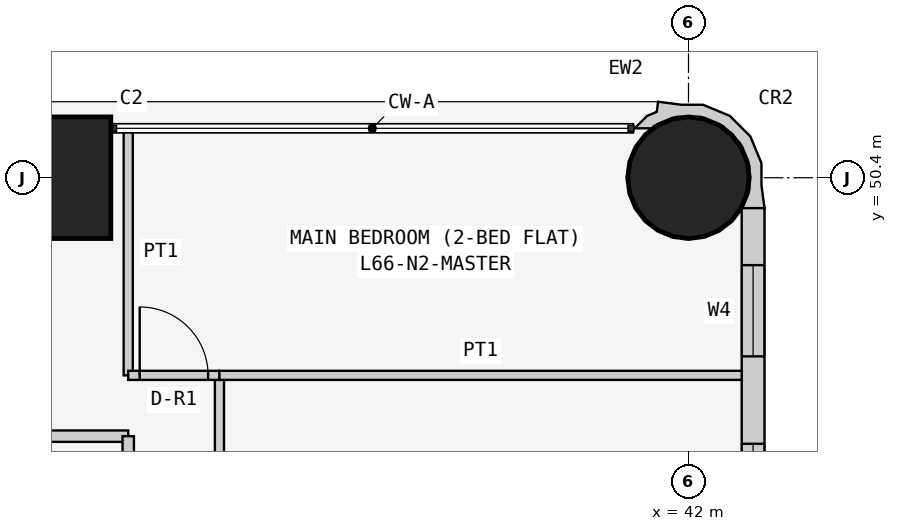
"""IFC4 building model, lengths in metres.
Left out: names, types, materials, properties, quantities, classifications, styles, units other than length and angle.
Written with IfcOpenShell. Run it as: python <this file> out.ifc"""

import sys

from ifc_helpers import new_model, si_unit, direction, frame, frame_2d, origin, origin_2d, place, context, subcontext, project, spatial, polyline, rectangle, circle, outline, extrude, element, fill, save


model = new_model("IFC4")
c1 = context("Model", 3, precision=1e-05, world=origin(), true_north=direction((0.0, 1.0)))
c2 = subcontext(c1, "Body", "Model", "MODEL_VIEW")
j1 = project(units=[si_unit("LENGTHUNIT", "METRE"), si_unit("PLANEANGLEUNIT", "RADIAN")], contexts=[c1])
p1 = place(None, origin())
s1 = spatial("IfcSite", under=j1, at=p1, CompositionType="ELEMENT")
p2 = place(p1, origin())
s2 = spatial("IfcBuilding", under=s1, at=p2, CompositionType="ELEMENT")
p3 = place(p2, frame((0.0, 0.0, 254.1)))
s3 = spatial("IfcBuildingStorey", under=s2, at=p3, CompositionType="ELEMENT", Elevation=254.1)
p4 = place(p3, frame((33.6, 50.4, 0.0), z_axis=(0.0, 0.0, 1.0), x_axis=(1.0, 0.0, 0.0)))
e1 = element("IfcColumn", 1, at=p4, inside=s3, PredefinedType="COLUMN", context=c2, shape_type="SweptSolid", body=[
    extrude(rectangle(XDim=1.6, YDim=1.6, at=origin_2d()), origin(), (0.0, 0.0, 1.0), 3.6),
])
p5 = place(p3, frame((42.0, 50.4, 0.0), z_axis=(0.0, 0.0, 1.0), x_axis=(1.0, 0.0, 0.0)))
e2 = element("IfcColumn", 2, at=p5, inside=s3, PredefinedType="COLUMN", context=c2, shape_type="SweptSolid", body=[
    extrude(circle(Radius=0.8, at=origin_2d()), origin(), (0.0, 0.0, 1.0), 3.6),
])
p6 = place(p3, frame((42.85, 43.0, 0.0), z_axis=(0.0, 0.0, 1.0), x_axis=(0.0, 1.0, 0.0)))
e3 = element("IfcWall", 3, at=p6, inside=s3, PredefinedType="SOLIDWALL", context=c2, shape_type="SweptSolid", body=[
    extrude(rectangle(XDim=7.0, YDim=0.3, at=frame_2d((3.5, 0.0))), origin(), (0.0, 0.0, 1.0), 3.45),
])
p7 = place(p6, frame((1.5, 0.0, 0.9)))
e4 = element("IfcOpeningElement", 4, at=p7, cuts=e3, PredefinedType="OPENING", context=c2, shape_type="SweptSolid", body=[
    extrude(rectangle(XDim=2.4, YDim=1.5, at=frame_2d((1.2, 0.75))), frame((0.0, 0.16, 0.0), z_axis=(0.0, -1.0, 0.0), x_axis=(1.0, 0.0, 0.0)), (0.0, 0.0, 1.0), 0.32),
])
p8 = place(p6, frame((5.05, 0.0, 0.9)))
e5 = element("IfcOpeningElement", 5, at=p8, cuts=e3, PredefinedType="OPENING", context=c2, shape_type="SweptSolid", body=[
    extrude(rectangle(XDim=1.2, YDim=1.5, at=frame_2d((0.6, 0.75))), frame((0.0, 0.16, 0.0), z_axis=(0.0, -1.0, 0.0), x_axis=(1.0, 0.0, 0.0)), (0.0, 0.0, 1.0), 0.32),
])
p9 = place(p3, frame((42.817, 50.073, 0.0), z_axis=(0.0, 0.0, 1.0), x_axis=(0.343276641956, 0.93923434088, 0.0)))
e6 = element("IfcWall", 6, at=p9, inside=s3, PredefinedType="SOLIDWALL", context=c2, shape_type="SweptSolid", body=[
    extrude(outline(polyline([(0.266, -0.055), (0.535, 0.044), (0.817, 0.302), (0.978, 0.648), (0.994, 1.03), (0.895, 1.3), (0.828, 1.598), (0.697, 1.569), (0.604, 1.67), (0.394, 1.767), (0.471, 1.556), (0.509, 1.539), (0.724, 1.304), (0.833, 1.005), (0.82, 0.687), (0.686, 0.397), (0.451, 0.182), (0.152, 0.073), (-0.116, 0.084), (-0.128, 0.078), (-0.146, 0.071), (-0.006, -0.197), (0.266, -0.055)])), origin(), (0.0, 0.0, 1.0), 3.45),
])
p10 = place(p3, frame((29.4, 47.0, 0.0), z_axis=(0.0, 0.0, 1.0), x_axis=(1.0, 0.0, 0.0)))
e7 = element("IfcWall", 7, at=p10, inside=s3, PredefinedType="PARTITIONING", context=c2, shape_type="SweptSolid", body=[
    extrude(rectangle(XDim=5.229, YDim=0.15, at=frame_2d((2.615, 0.0))), origin(), (0.0, 0.0, 1.0), 3.45),
])
p11 = place(p3, frame((34.629, 47.0, 0.0), z_axis=(0.0, 0.0, 1.0), x_axis=(0.0, -1.0, 0.0)))
e8 = element("IfcWall", 8, at=p11, inside=s3, PredefinedType="PARTITIONING", context=c2, shape_type="SweptSolid", body=[
    extrude(rectangle(XDim=2.0, YDim=0.15, at=frame_2d((1.0, 0.0))), origin(), (0.0, 0.0, 1.0), 3.45),
])
p12 = place(p11, frame((0.6, 0.0, 0.0)))
e9 = element("IfcOpeningElement", 9, at=p12, cuts=e8, PredefinedType="OPENING", context=c2, shape_type="SweptSolid", body=[
    extrude(rectangle(XDim=0.8, YDim=2.1, at=frame_2d((0.4, 1.05))), frame((0.0, 0.085, 0.0), z_axis=(0.0, -1.0, 0.0), x_axis=(1.0, 0.0, 0.0)), (0.0, 0.0, 1.0), 0.17),
])
p13 = place(p3, frame((35.829, 47.8, 0.0), z_axis=(0.0, 0.0, 1.0), x_axis=(0.0, -1.0, 0.0)))
e10 = element("IfcWall", 10, at=p13, inside=s3, PredefinedType="PARTITIONING", context=c2, shape_type="SweptSolid", body=[
    extrude(rectangle(XDim=4.875, YDim=0.12, at=frame_2d((2.438, 0.0))), origin(), (0.0, 0.0, 1.0), 3.45),
])
p14 = place(p13, frame((1.85, 0.0, 0.0)))
e11 = element("IfcOpeningElement", 11, at=p14, cuts=e10, PredefinedType="OPENING", context=c2, shape_type="SweptSolid", body=[
    extrude(rectangle(XDim=0.9, YDim=2.1, at=frame_2d((0.45, 1.05))), frame((0.0, 0.07, 0.0), z_axis=(0.0, -1.0, 0.0), x_axis=(1.0, 0.0, 0.0)), (0.0, 0.0, 1.0), 0.14),
])
p15 = place(p3, frame((34.629, 51.05, 0.0), z_axis=(0.0, 0.0, 1.0), x_axis=(0.0, -1.0, 0.0)))
e12 = element("IfcWall", 12, at=p15, inside=s3, PredefinedType="PARTITIONING", context=c2, shape_type="SweptSolid", body=[
    extrude(rectangle(XDim=3.25, YDim=0.12, at=frame_2d((1.625, 0.0))), origin(), (0.0, 0.0, 1.0), 3.45),
])
p16 = place(p3, frame((34.629, 47.8, 0.0), z_axis=(0.0, 0.0, 1.0), x_axis=(1.0, 0.0, 0.0)))
e13 = element("IfcWall", 13, at=p16, inside=s3, PredefinedType="PARTITIONING", context=c2, shape_type="SweptSolid", body=[
    extrude(rectangle(XDim=1.2, YDim=0.12, at=frame_2d((0.6, 0.0))), origin(), (0.0, 0.0, 1.0), 3.45),
])
p17 = place(p16, frame((0.151, 0.0, 0.0)))
e14 = element("IfcOpeningElement", 14, at=p17, cuts=e13, PredefinedType="OPENING", context=c2, shape_type="SweptSolid", body=[
    extrude(rectangle(XDim=0.9, YDim=2.1, at=frame_2d((0.45, 1.05))), frame((0.0, 0.07, 0.0), z_axis=(0.0, -1.0, 0.0), x_axis=(1.0, 0.0, 0.0)), (0.0, 0.0, 1.0), 0.14),
])
p18 = place(p3, frame((35.829, 47.8, 0.0), z_axis=(0.0, 0.0, 1.0), x_axis=(1.0, 0.0, 0.0)))
e15 = element("IfcWall", 15, at=p18, inside=s3, PredefinedType="PARTITIONING", context=c2, shape_type="SweptSolid", body=[
    extrude(rectangle(XDim=6.871, YDim=0.12, at=frame_2d((3.436, 0.0))), origin(), (0.0, 0.0, 1.0), 3.45),
])
p19 = place(p7, origin())
e16 = element("IfcWindow", 16, at=p19, inside=s3, PartitioningType="SINGLE_PANEL", PredefinedType="WINDOW", context=c2, shape_type="SweptSolid", body=[
    extrude(rectangle(XDim=2.4, YDim=1.5, at=frame_2d((1.2, 0.75))), frame((0.0, 0.03, 0.0), z_axis=(0.0, -1.0, 0.0), x_axis=(1.0, 0.0, 0.0)), (0.0, 0.0, 1.0), 0.06),
])
fill(e4, e16)
p20 = place(p8, origin())
e17 = element("IfcWindow", 17, at=p20, inside=s3, PartitioningType="SINGLE_PANEL", PredefinedType="WINDOW", context=c2, shape_type="SweptSolid", body=[
    extrude(rectangle(XDim=1.2, YDim=1.5, at=frame_2d((0.6, 0.75))), frame((0.0, 0.03, 0.0), z_axis=(0.0, -1.0, 0.0), x_axis=(1.0, 0.0, 0.0)), (0.0, 0.0, 1.0), 0.06),
])
fill(e5, e17)
p21 = place(p17, origin())
e18 = element("IfcDoor", 18, at=p21, inside=s3, OperationType="SINGLE_SWING_LEFT", PredefinedType="DOOR", context=c2, shape_type="SweptSolid", body=[
    extrude(rectangle(XDim=0.9, YDim=2.1, at=frame_2d((0.45, 1.05))), frame((0.0, 0.025, 0.0), z_axis=(0.0, -1.0, 0.0), x_axis=(1.0, 0.0, 0.0)), (0.0, 0.0, 1.0), 0.05),
])
fill(e14, e18)
save(model, sys.argv[1])
